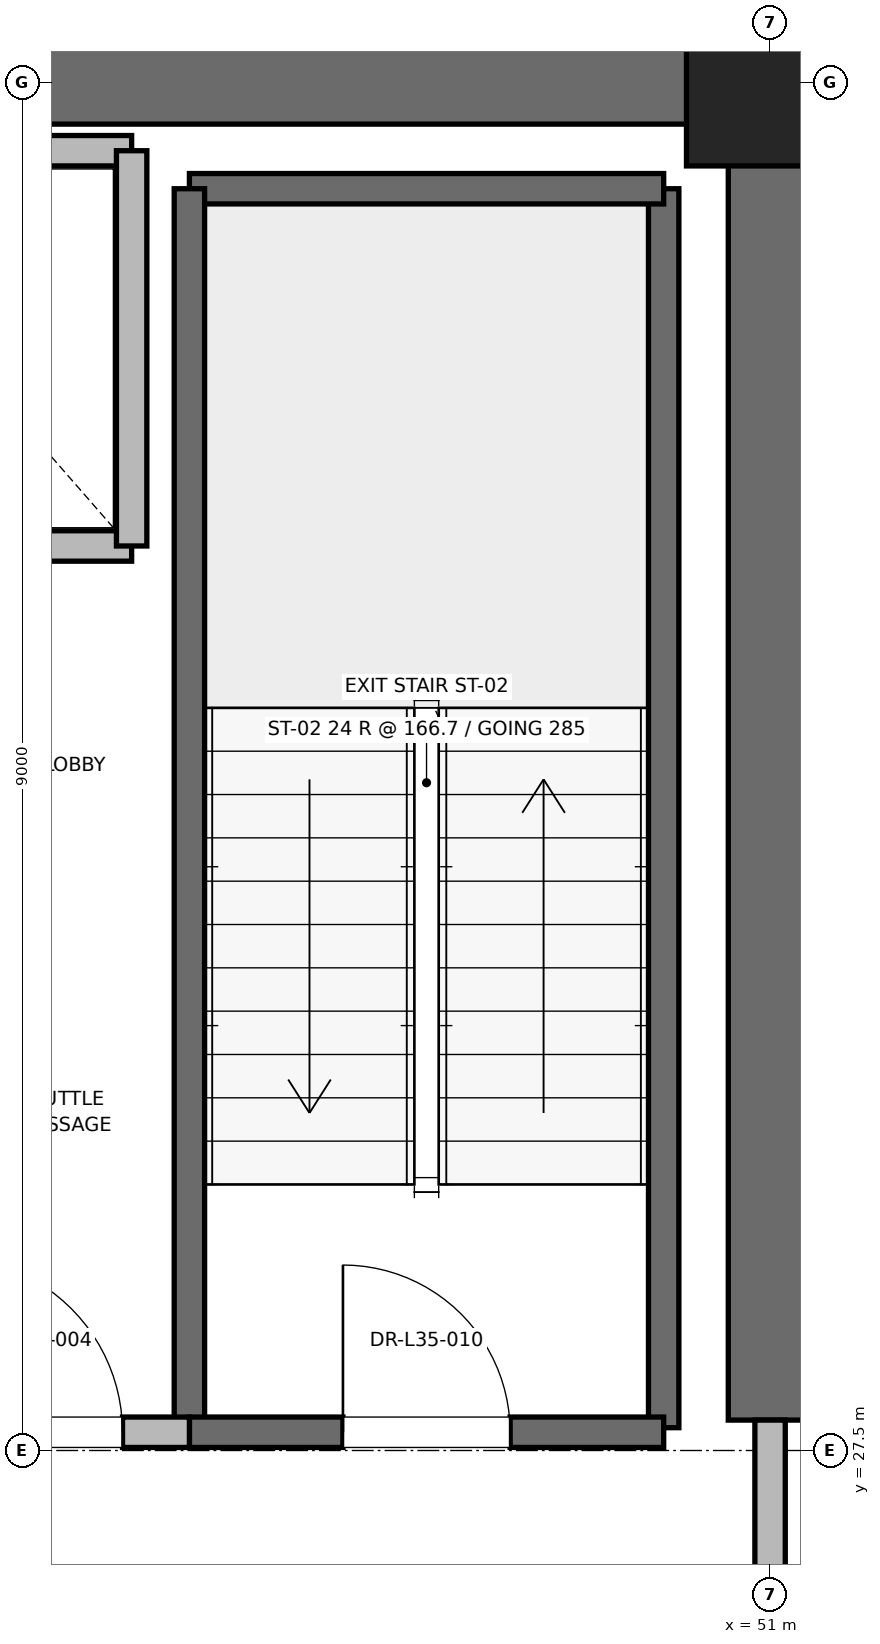
"""IFC4 building model, lengths in metres.
Left out: names, types, materials, properties, quantities, classifications, styles, units other than length and angle.
Written with IfcOpenShell. Run it as: python <this file> out.ifc"""

import sys

from ifc_helpers import new_model, si_unit, direction, frame, frame_2d, origin, origin_2d, place, context, subcontext, project, spatial, rectangle, extrude, element, fill, save


model = new_model("IFC4")
c1 = context("Model", 3, precision=1e-05, world=origin(), true_north=direction((0.0, 1.0)))
c2 = subcontext(c1, "Body", "Model", "MODEL_VIEW")
j1 = project(units=[si_unit("LENGTHUNIT", "METRE"), si_unit("PLANEANGLEUNIT", "RADIAN")], contexts=[c1])
p1 = place(None, origin())
s1 = spatial("IfcSite", under=j1, at=p1, CompositionType="ELEMENT")
p2 = place(p1, origin())
s2 = spatial("IfcBuilding", under=s1, at=p2, CompositionType="ELEMENT")
p3 = place(p2, frame((0.0, 0.0, 152.4)))
s3 = spatial("IfcBuildingStorey", under=s2, at=p3, CompositionType="ELEMENT", Elevation=152.4)
p4 = place(p3, frame((51.0, 36.5, 0.0), z_axis=(0.0, 0.0, 1.0), x_axis=(1.0, 0.0, 0.0)))
e1 = element("IfcColumn", 1, at=p4, inside=s3, PredefinedType="PILASTER", context=c2, shape_type="SweptSolid", body=[
    extrude(rectangle(XDim=1.1, YDim=1.1, at=origin_2d()), origin(), (0.0, 0.0, 1.0), 4.0),
])
p5 = place(p3, frame((45.2, 36.5, 0.0), z_axis=(0.0, 0.0, 1.0), x_axis=(1.0, 0.0, 0.0)))
e2 = element("IfcWall", 2, at=p5, inside=s3, PredefinedType="SHEAR", context=c2, shape_type="SweptSolid", body=[
    extrude(rectangle(XDim=5.8, YDim=0.55, at=frame_2d((2.9, 0.0))), origin(), (0.0, 0.0, 1.0), 3.775),
])
p6 = place(p3, frame((51.0, 27.7, 0.0), z_axis=(0.0, 0.0, 1.0), x_axis=(0.0, 1.0, 0.0)))
e3 = element("IfcWall", 3, at=p6, inside=s3, PredefinedType="SHEAR", context=c2, shape_type="SweptSolid", body=[
    extrude(rectangle(XDim=8.8, YDim=0.55, at=frame_2d((4.4, 0.0))), origin(), (0.0, 0.0, 1.0), 3.775),
])
p7 = place(p3, frame((50.3, 27.65, 0.0), z_axis=(0.0, 0.0, 1.0), x_axis=(0.0, 1.0, 0.0)))
e4 = element("IfcWall", 4, at=p7, inside=s3, PredefinedType="SOLIDWALL", context=c2, shape_type="SweptSolid", body=[
    extrude(rectangle(XDim=8.15, YDim=0.2, at=frame_2d((4.075, 0.0))), origin(), (0.0, 0.0, 1.0), 3.775),
])
p8 = place(p3, frame((47.18, 35.8, 0.0), z_axis=(0.0, 0.0, 1.0), x_axis=(1.0, 0.0, 0.0)))
e5 = element("IfcWall", 5, at=p8, inside=s3, PredefinedType="SOLIDWALL", context=c2, shape_type="SweptSolid", body=[
    extrude(rectangle(XDim=3.12, YDim=0.2, at=frame_2d((1.56, 0.0))), origin(), (0.0, 0.0, 1.0), 3.775),
])
p9 = place(p3, frame((47.18, 27.62, 0.0), z_axis=(0.0, 0.0, 1.0), x_axis=(0.0, 1.0, 0.0)))
e6 = element("IfcWall", 6, at=p9, inside=s3, PredefinedType="SOLIDWALL", context=c2, shape_type="SweptSolid", body=[
    extrude(rectangle(XDim=8.18, YDim=0.2, at=frame_2d((4.09, 0.0))), origin(), (0.0, 0.0, 1.0), 3.775),
])
p10 = place(p3, frame((47.18, 27.62, 0.0), z_axis=(0.0, 0.0, 1.0), x_axis=(1.0, 0.0, 0.0)))
e7 = element("IfcWall", 7, at=p10, inside=s3, PredefinedType="SOLIDWALL", context=c2, shape_type="SweptSolid", body=[
    extrude(rectangle(XDim=3.12, YDim=0.2, at=frame_2d((1.56, 0.0))), origin(), (0.0, 0.0, 1.0), 3.775),
])
p11 = place(p10, frame((1.01, 0.0, 0.0)))
e8 = element("IfcOpeningElement", 8, at=p11, cuts=e7, PredefinedType="OPENING", context=c2, shape_type="SweptSolid", body=[
    extrude(rectangle(XDim=1.1, YDim=2.15, at=frame_2d((0.55, 1.075))), frame((0.0, 0.1, 0.0), z_axis=(0.0, -1.0, 0.0), x_axis=(1.0, 0.0, 0.0)), (0.0, 0.0, 1.0), 0.2),
])
p12 = place(p3, frame((45.15, 27.62, 0.0), z_axis=(0.0, 0.0, 1.0), x_axis=(1.0, 0.0, 0.0)))
e9 = element("IfcWall", 9, at=p12, inside=s3, PredefinedType="PARTITIONING", context=c2, shape_type="SweptSolid", body=[
    extrude(rectangle(XDim=2.03, YDim=0.2, at=frame_2d((1.015, 0.0))), origin(), (0.0, 0.0, 1.0), 3.775),
])
p13 = place(p12, frame((0.44, 0.0, 0.0)))
e10 = element("IfcOpeningElement", 10, at=p13, cuts=e9, PredefinedType="OPENING", context=c2, shape_type="SweptSolid", body=[
    extrude(rectangle(XDim=1.15, YDim=2.2, at=frame_2d((0.575, 1.1))), frame((0.0, 0.1, 0.0), z_axis=(0.0, -1.0, 0.0), x_axis=(1.0, 0.0, 0.0)), (0.0, 0.0, 1.0), 0.2),
])
p14 = place(p3, frame((51.0, 24.3, 0.0), z_axis=(0.0, 0.0, 1.0), x_axis=(0.0, 1.0, 0.0)))
e11 = element("IfcWall", 11, at=p14, inside=s3, PredefinedType="PARTITIONING", context=c2, shape_type="SweptSolid", body=[
    extrude(rectangle(XDim=3.4, YDim=0.2, at=frame_2d((1.7, 0.0))), origin(), (0.0, 0.0, 1.0), 2.755),
])
p15 = place(p14, frame((1.125, 0.0, 0.0)))
e12 = element("IfcOpeningElement", 12, at=p15, cuts=e11, PredefinedType="OPENING", context=c2, shape_type="SweptSolid", body=[
    extrude(rectangle(XDim=1.15, YDim=2.2, at=frame_2d((0.575, 1.1))), frame((0.0, 0.1, 0.0), z_axis=(0.0, -1.0, 0.0), x_axis=(1.0, 0.0, 0.0)), (0.0, 0.0, 1.0), 0.2),
])
p16 = place(p3, frame((44.5, 33.45, 0.0), z_axis=(0.0, 0.0, 1.0), x_axis=(1.0, 0.0, 0.0)))
e13 = element("IfcWall", 13, at=p16, inside=s3, PredefinedType="SOLIDWALL", context=c2, shape_type="SweptSolid", body=[
    extrude(rectangle(XDim=2.3, YDim=0.2, at=frame_2d((1.15, 0.0))), origin(), (0.0, 0.0, 1.0), 3.775),
])
p17 = place(p3, frame((46.8, 36.05, 0.0), z_axis=(0.0, 0.0, 1.0), x_axis=(-1.0, 0.0, 0.0)))
e14 = element("IfcWall", 14, at=p17, inside=s3, PredefinedType="SOLIDWALL", context=c2, shape_type="SweptSolid", body=[
    extrude(rectangle(XDim=2.3, YDim=0.2, at=frame_2d((1.15, 0.0))), origin(), (0.0, 0.0, 1.0), 2.755),
])
p18 = place(p3, frame((46.8, 33.45, 0.0), z_axis=(0.0, 0.0, 1.0), x_axis=(0.0, 1.0, 0.0)))
e15 = element("IfcWall", 15, at=p18, inside=s3, PredefinedType="SOLIDWALL", context=c2, shape_type="SweptSolid", body=[
    extrude(rectangle(XDim=2.6, YDim=0.2, at=frame_2d((1.3, 0.0))), origin(), (0.0, 0.0, 1.0), 3.775),
])
p19 = place(p11, origin())
e16 = element("IfcDoor", 16, at=p19, inside=s3, OperationType="SINGLE_SWING_LEFT", PredefinedType="DOOR", context=c2, shape_type="SweptSolid", body=[
    extrude(rectangle(XDim=1.1, YDim=2.15, at=frame_2d((0.55, 1.075))), frame((0.0, 0.025, 0.0), z_axis=(0.0, -1.0, 0.0), x_axis=(1.0, 0.0, 0.0)), (0.0, 0.0, 1.0), 0.05),
])
fill(e8, e16)
p20 = place(p13, origin())
e17 = element("IfcDoor", 17, at=p20, inside=s3, OperationType="SINGLE_SWING_LEFT", PredefinedType="DOOR", context=c2, shape_type="SweptSolid", body=[
    extrude(rectangle(XDim=1.15, YDim=2.2, at=frame_2d((0.575, 1.1))), frame((0.0, 0.025, 0.0), z_axis=(0.0, -1.0, 0.0), x_axis=(1.0, 0.0, 0.0)), (0.0, 0.0, 1.0), 0.05),
])
fill(e10, e17)
save(model, sys.argv[1])
